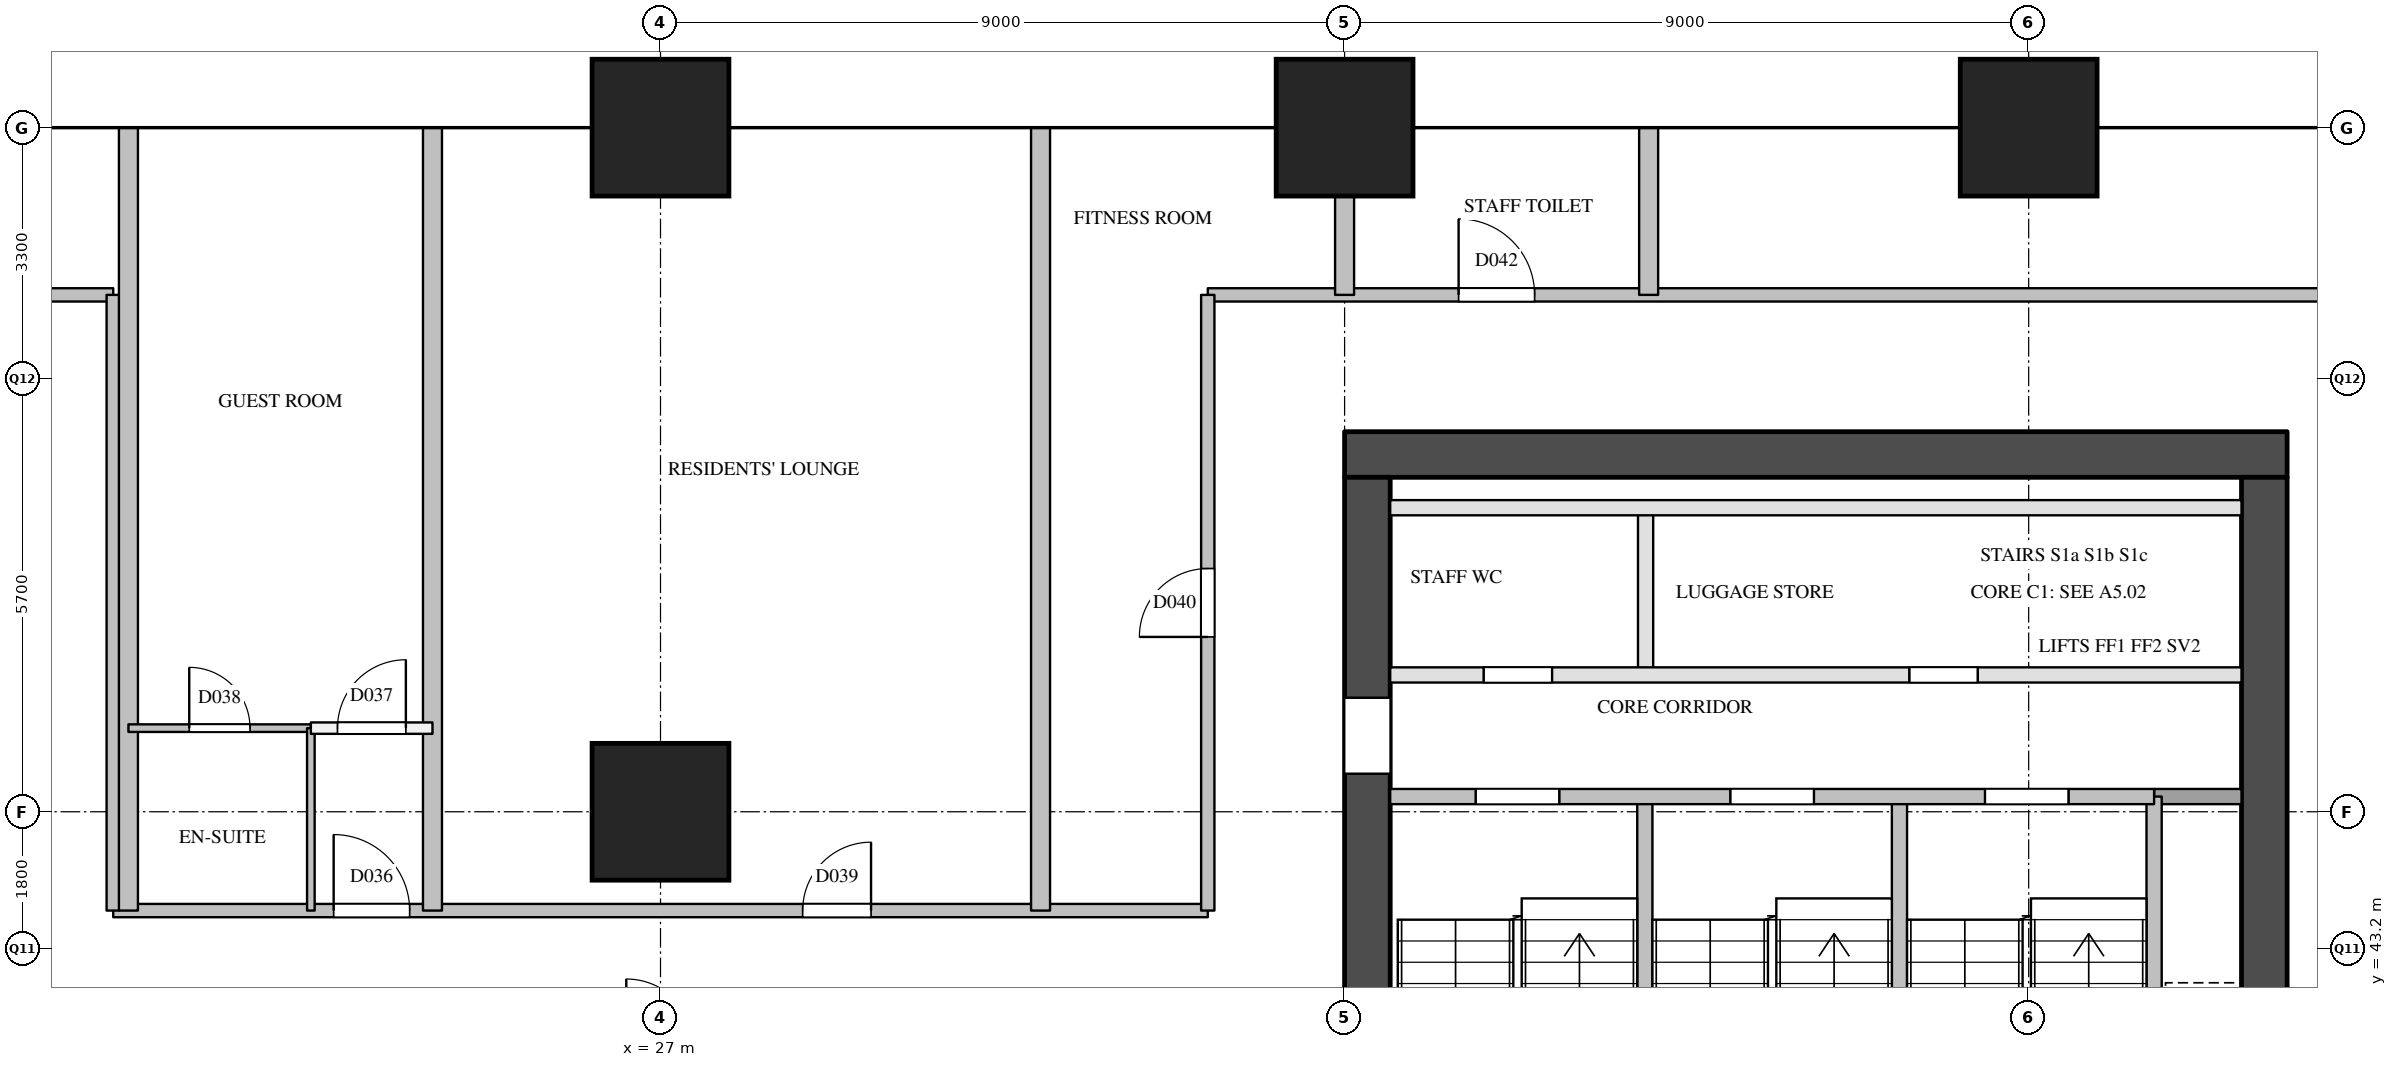
"""IFC4 building model, lengths in metres.
Left out: names, types, materials, properties, quantities, classifications, styles, units other than length and angle.
Written with IfcOpenShell. Run it as: python <this file> out.ifc"""

import sys

from ifc_helpers import new_model, si_unit, direction, frame, frame_2d, origin, origin_2d, place, context, subcontext, project, spatial, rectangle, extrude, element, fill, save


model = new_model("IFC4")
c1 = context("Model", 3, precision=1e-05, world=origin(), true_north=direction((0.0, 1.0)))
c2 = subcontext(c1, "Body", "Model", "MODEL_VIEW")
j1 = project(units=[si_unit("LENGTHUNIT", "METRE"), si_unit("PLANEANGLEUNIT", "RADIAN")], contexts=[c1])
p1 = place(None, origin())
s1 = spatial("IfcSite", under=j1, at=p1, CompositionType="ELEMENT")
p2 = place(p1, origin())
s2 = spatial("IfcBuilding", under=s1, at=p2, CompositionType="ELEMENT")
p3 = place(p2, frame((0.0, 0.0, 34.8)))
s3 = spatial("IfcBuildingStorey", under=s2, at=p3, CompositionType="ELEMENT", Elevation=34.8)
for number, where, z_axis, x_axis in (
    (1, (27.0, 45.0, 0.0), (0.0, 0.0, 1.0), (1.0, 0.0, 0.0)),
    (2, (27.0, 54.0, 0.0), (0.0, 0.0, 1.0), (1.0, 0.0, 0.0)),
    (3, (36.0, 54.0, 0.0), (0.0, 0.0, 1.0), (1.0, 0.0, 0.0)),
    (4, (45.0, 54.0, 0.0), (0.0, 0.0, 1.0), (1.0, 0.0, 0.0)),
):
    element("IfcColumn", number, at=place(p3, frame(where, z_axis=z_axis, x_axis=x_axis)), inside=s3, PredefinedType="COLUMN", context=c2, shape_type="SweptSolid", body=[
        extrude(rectangle(XDim=1.8, YDim=1.8, at=origin_2d()), origin(), (0.0, 0.0, 1.0), 3.8),
    ])
p4 = place(p3, frame((36.0, 49.7, 0.0), z_axis=(0.0, 0.0, 1.0), x_axis=(1.0, 0.0, 0.0)))
e5 = element("IfcWall", 5, at=p4, inside=s3, PredefinedType="SHEAR", context=c2, shape_type="SweptSolid", body=[
    extrude(rectangle(XDim=12.4, YDim=0.6, at=frame_2d((6.2, 0.0))), origin(), (0.0, 0.0, 1.0), 3.5),
])
p5 = place(p3, frame((36.3, 29.1, 0.0), z_axis=(0.0, 0.0, 1.0), x_axis=(0.0, 1.0, 0.0)))
e6 = element("IfcWall", 6, at=p5, inside=s3, PredefinedType="SHEAR", context=c2, shape_type="SweptSolid", body=[
    extrude(rectangle(XDim=20.3, YDim=0.6, at=frame_2d((10.15, 0.0))), origin(), (0.0, 0.0, 1.0), 3.5),
])
p6 = place(p5, frame((3.6, 0.0, 0.0)))
e7 = element("IfcOpeningElement", 7, at=p6, cuts=e6, PredefinedType="OPENING", context=c2, shape_type="SweptSolid", body=[
    extrude(rectangle(XDim=1.8, YDim=2.1, at=frame_2d((0.9, 1.05))), frame((0.0, 0.31, 0.0), z_axis=(0.0, -1.0, 0.0), x_axis=(1.0, 0.0, 0.0)), (0.0, 0.0, 1.0), 0.62),
])
p7 = place(p5, frame((16.4, 0.0, 0.0)))
e8 = element("IfcOpeningElement", 8, at=p7, cuts=e6, PredefinedType="OPENING", context=c2, shape_type="SweptSolid", body=[
    extrude(rectangle(XDim=1.0, YDim=2.1, at=frame_2d((0.5, 1.05))), frame((0.0, 0.31, 0.0), z_axis=(0.0, -1.0, 0.0), x_axis=(1.0, 0.0, 0.0)), (0.0, 0.0, 1.0), 0.62),
])
p8 = place(p3, frame((48.1, 29.1, 0.0), z_axis=(0.0, 0.0, 1.0), x_axis=(0.0, 1.0, 0.0)))
e9 = element("IfcWall", 9, at=p8, inside=s3, PredefinedType="SHEAR", context=c2, shape_type="SweptSolid", body=[
    extrude(rectangle(XDim=20.3, YDim=0.6, at=frame_2d((10.15, 0.0))), origin(), (0.0, 0.0, 1.0), 3.5),
])
p9 = place(p8, frame((12.5, 0.0, 0.0)))
e10 = element("IfcOpeningElement", 10, at=p9, cuts=e9, PredefinedType="OPENING", context=c2, shape_type="SweptSolid", body=[
    extrude(rectangle(XDim=0.7, YDim=2.1, at=frame_2d((0.35, 1.05))), frame((0.0, 0.31, 0.0), z_axis=(0.0, -1.0, 0.0), x_axis=(1.0, 0.0, 0.0)), (0.0, 0.0, 1.0), 0.62),
])
p10 = place(p8, frame((3.9, 0.0, 0.0)))
e11 = element("IfcOpeningElement", 11, at=p10, cuts=e9, PredefinedType="OPENING", context=c2, shape_type="SweptSolid", body=[
    extrude(rectangle(XDim=1.8, YDim=2.1, at=frame_2d((0.9, 1.05))), frame((0.0, 0.31, 0.0), z_axis=(0.0, -1.0, 0.0), x_axis=(1.0, 0.0, 0.0)), (0.0, 0.0, 1.0), 0.62),
])
p11 = place(p3, frame((39.95, 40.78, 0.0), z_axis=(0.0, 0.0, 1.0), x_axis=(0.0, 1.0, 0.0)))
e12 = element("IfcWall", 12, at=p11, inside=s3, PredefinedType="SOLIDWALL", context=c2, shape_type="SweptSolid", body=[
    extrude(rectangle(XDim=4.42, YDim=0.2, at=frame_2d((2.21, 0.0))), origin(), (0.0, 0.0, 1.0), 3.5),
])
p12 = place(p3, frame((39.96, 46.8, 0.0), z_axis=(0.0, 0.0, 1.0), x_axis=(0.0, 1.0, 0.0)))
e13 = element("IfcWall", 13, at=p12, inside=s3, PredefinedType="PARTITIONING", context=c2, shape_type="SweptSolid", body=[
    extrude(rectangle(XDim=2.2, YDim=0.2, at=frame_2d((1.1, 0.0))), origin(), (0.0, 0.0, 1.0), 3.5),
])
for number, where, z_axis, x_axis in (
    (14, (43.3, 40.78, 0.0), (0.0, 0.0, 1.0), (0.0, 1.0, 0.0)),
    (15, (46.65, 40.78, 0.0), (0.0, 0.0, 1.0), (0.0, 1.0, 0.0)),
):
    element("IfcWall", number, at=place(p3, frame(where, z_axis=z_axis, x_axis=x_axis)), inside=s3, PredefinedType="SOLIDWALL", context=c2, shape_type="SweptSolid", body=[
        extrude(rectangle(XDim=4.42, YDim=0.2, at=frame_2d((2.21, 0.0))), origin(), (0.0, 0.0, 1.0), 3.5),
    ])
p13 = place(p3, frame((46.65, 45.2, 0.0), z_axis=(0.0, 0.0, 1.0), x_axis=(1.0, 0.0, 0.0)))
e16 = element("IfcWall", 16, at=p13, inside=s3, PredefinedType="SOLIDWALL", context=c2, shape_type="SweptSolid", body=[
    extrude(rectangle(XDim=1.15, YDim=0.2, at=frame_2d((0.575, 0.0))), origin(), (0.0, 0.0, 1.0), 3.5),
])
p14 = place(p3, frame((36.6, 45.2, 0.0), z_axis=(0.0, 0.0, 1.0), x_axis=(1.0, 0.0, 0.0)))
e17 = element("IfcWall", 17, at=p14, inside=s3, PredefinedType="SOLIDWALL", context=c2, shape_type="SweptSolid", body=[
    extrude(rectangle(XDim=10.05, YDim=0.2, at=frame_2d((5.025, 0.0))), origin(), (0.0, 0.0, 1.0), 3.5),
])
p15 = place(p14, frame((1.125, 0.0, 0.0)))
e18 = element("IfcOpeningElement", 18, at=p15, cuts=e17, PredefinedType="OPENING", context=c2, shape_type="SweptSolid", body=[
    extrude(rectangle(XDim=1.1, YDim=2.1, at=frame_2d((0.55, 1.05))), frame((0.0, 0.11, 0.0), z_axis=(0.0, -1.0, 0.0), x_axis=(1.0, 0.0, 0.0)), (0.0, 0.0, 1.0), 0.22),
])
p16 = place(p14, frame((4.475, 0.0, 0.0)))
e19 = element("IfcOpeningElement", 19, at=p16, cuts=e17, PredefinedType="OPENING", context=c2, shape_type="SweptSolid", body=[
    extrude(rectangle(XDim=1.1, YDim=2.1, at=frame_2d((0.55, 1.05))), frame((0.0, 0.11, 0.0), z_axis=(0.0, -1.0, 0.0), x_axis=(1.0, 0.0, 0.0)), (0.0, 0.0, 1.0), 0.22),
])
p17 = place(p14, frame((7.825, 0.0, 0.0)))
e20 = element("IfcOpeningElement", 20, at=p17, cuts=e17, PredefinedType="OPENING", context=c2, shape_type="SweptSolid", body=[
    extrude(rectangle(XDim=1.1, YDim=2.1, at=frame_2d((0.55, 1.05))), frame((0.0, 0.11, 0.0), z_axis=(0.0, -1.0, 0.0), x_axis=(1.0, 0.0, 0.0)), (0.0, 0.0, 1.0), 0.22),
])
p18 = place(p3, frame((36.6, 46.8, 0.0), z_axis=(0.0, 0.0, 1.0), x_axis=(1.0, 0.0, 0.0)))
e21 = element("IfcWall", 21, at=p18, inside=s3, PredefinedType="PARTITIONING", context=c2, shape_type="SweptSolid", body=[
    extrude(rectangle(XDim=11.2, YDim=0.2, at=frame_2d((5.6, 0.0))), origin(), (0.0, 0.0, 1.0), 3.5),
])
p19 = place(p18, frame((1.23, 0.0, 0.0)))
e22 = element("IfcOpeningElement", 22, at=p19, cuts=e21, PredefinedType="OPENING", context=c2, shape_type="SweptSolid", body=[
    extrude(rectangle(XDim=0.9, YDim=2.1, at=frame_2d((0.45, 1.05))), frame((0.0, 0.11, 0.0), z_axis=(0.0, -1.0, 0.0), x_axis=(1.0, 0.0, 0.0)), (0.0, 0.0, 1.0), 0.22),
])
p20 = place(p18, frame((6.83, 0.0, 0.0)))
e23 = element("IfcOpeningElement", 23, at=p20, cuts=e21, PredefinedType="OPENING", context=c2, shape_type="SweptSolid", body=[
    extrude(rectangle(XDim=0.9, YDim=2.1, at=frame_2d((0.45, 1.05))), frame((0.0, 0.11, 0.0), z_axis=(0.0, -1.0, 0.0), x_axis=(1.0, 0.0, 0.0)), (0.0, 0.0, 1.0), 0.22),
])
p21 = place(p3, frame((36.6, 49.0, 0.0), z_axis=(0.0, 0.0, 1.0), x_axis=(1.0, 0.0, 0.0)))
e24 = element("IfcWall", 24, at=p21, inside=s3, PredefinedType="PARTITIONING", context=c2, shape_type="SweptSolid", body=[
    extrude(rectangle(XDim=11.2, YDim=0.2, at=frame_2d((5.6, 0.0))), origin(), (0.0, 0.0, 1.0), 3.5),
])
p22 = place(p3, frame((19.8, 43.7, 0.0), z_axis=(0.0, 0.0, 1.0), x_axis=(1.0, 0.0, 0.0)))
e25 = element("IfcWall", 25, at=p22, inside=s3, PredefinedType="PARTITIONING", context=c2, shape_type="SweptSolid", body=[
    extrude(rectangle(XDim=14.4, YDim=0.175, at=frame_2d((7.2, 0.0))), origin(), (0.0, 0.0, 1.0), 2.5),
])
p23 = place(p22, frame((2.9, 0.0, 0.0)))
e26 = element("IfcOpeningElement", 26, at=p23, cuts=e25, PredefinedType="OPENING", context=c2, shape_type="SweptSolid", body=[
    extrude(rectangle(XDim=1.0, YDim=2.1, at=frame_2d((0.5, 1.05))), frame((0.0, 0.097, 0.0), z_axis=(0.0, -1.0, 0.0), x_axis=(1.0, 0.0, 0.0)), (0.0, 0.0, 1.0), 0.195),
])
p24 = place(p22, frame((9.07, 0.0, 0.0)))
e27 = element("IfcOpeningElement", 27, at=p24, cuts=e25, PredefinedType="OPENING", context=c2, shape_type="SweptSolid", body=[
    extrude(rectangle(XDim=0.9, YDim=2.1, at=frame_2d((0.45, 1.05))), frame((0.0, 0.097, 0.0), z_axis=(0.0, -1.0, 0.0), x_axis=(1.0, 0.0, 0.0)), (0.0, 0.0, 1.0), 0.195),
])
p25 = place(p3, frame((3.8, 51.8, 0.0), z_axis=(0.0, 0.0, 1.0), x_axis=(1.0, 0.0, 0.0)))
e28 = element("IfcWall", 28, at=p25, inside=s3, PredefinedType="PARTITIONING", context=c2, shape_type="SweptSolid", body=[
    extrude(rectangle(XDim=16.0, YDim=0.175, at=frame_2d((8.0, 0.0))), origin(), (0.0, 0.0, 1.0), 3.5),
])
p26 = place(p25, frame((11.65, 0.0, 0.0)))
e29 = element("IfcOpeningElement", 29, at=p26, cuts=e28, PredefinedType="OPENING", context=c2, shape_type="SweptSolid", body=[
    extrude(rectangle(XDim=0.9, YDim=2.1, at=frame_2d((0.45, 1.05))), frame((0.0, 0.097, 0.0), z_axis=(0.0, -1.0, 0.0), x_axis=(1.0, 0.0, 0.0)), (0.0, 0.0, 1.0), 0.195),
])
p27 = place(p3, frame((34.2, 51.8, 0.0), z_axis=(0.0, 0.0, 1.0), x_axis=(1.0, 0.0, 0.0)))
e30 = element("IfcWall", 30, at=p27, inside=s3, PredefinedType="PARTITIONING", context=c2, shape_type="SweptSolid", body=[
    extrude(rectangle(XDim=16.0, YDim=0.175, at=frame_2d((8.0, 0.0))), origin(), (0.0, 0.0, 1.0), 3.5),
])
p28 = place(p27, frame((3.3, 0.0, 0.0)))
e31 = element("IfcOpeningElement", 31, at=p28, cuts=e30, PredefinedType="OPENING", context=c2, shape_type="SweptSolid", body=[
    extrude(rectangle(XDim=1.0, YDim=2.1, at=frame_2d((0.5, 1.05))), frame((0.0, 0.097, 0.0), z_axis=(0.0, -1.0, 0.0), x_axis=(1.0, 0.0, 0.0)), (0.0, 0.0, 1.0), 0.195),
])
p29 = place(p3, frame((19.8, 43.7, 0.0), z_axis=(0.0, 0.0, 1.0), x_axis=(0.0, 1.0, 0.0)))
e32 = element("IfcWall", 32, at=p29, inside=s3, PredefinedType="PARTITIONING", context=c2, shape_type="SweptSolid", body=[
    extrude(rectangle(XDim=8.1, YDim=0.175, at=frame_2d((4.05, 0.0))), origin(), (0.0, 0.0, 1.0), 3.5),
])
p30 = place(p3, frame((34.2, 43.7, 0.0), z_axis=(0.0, 0.0, 1.0), x_axis=(0.0, 1.0, 0.0)))
e33 = element("IfcWall", 33, at=p30, inside=s3, PredefinedType="PARTITIONING", context=c2, shape_type="SweptSolid", body=[
    extrude(rectangle(XDim=8.1, YDim=0.175, at=frame_2d((4.05, 0.0))), origin(), (0.0, 0.0, 1.0), 3.5),
])
p31 = place(p30, frame((3.6, 0.0, 0.0)))
e34 = element("IfcOpeningElement", 34, at=p31, cuts=e33, PredefinedType="OPENING", context=c2, shape_type="SweptSolid", body=[
    extrude(rectangle(XDim=0.9, YDim=2.1, at=frame_2d((0.45, 1.05))), frame((0.0, 0.097, 0.0), z_axis=(0.0, -1.0, 0.0), x_axis=(1.0, 0.0, 0.0)), (0.0, 0.0, 1.0), 0.195),
])
p32 = place(p3, frame((22.4, 46.1, 0.0), z_axis=(0.0, 0.0, 1.0), x_axis=(1.0, 0.0, 0.0)))
e35 = element("IfcWall", 35, at=p32, inside=s3, PredefinedType="PARTITIONING", context=c2, shape_type="SweptSolid", body=[
    extrude(rectangle(XDim=1.6, YDim=0.15, at=frame_2d((0.8, 0.0))), origin(), (0.0, 0.0, 1.0), 3.5),
])
p33 = place(p32, frame((0.35, 0.0, 0.0)))
e36 = element("IfcOpeningElement", 36, at=p33, cuts=e35, PredefinedType="OPENING", context=c2, shape_type="SweptSolid", body=[
    extrude(rectangle(XDim=0.9, YDim=2.1, at=frame_2d((0.45, 1.05))), frame((0.0, 0.085, 0.0), z_axis=(0.0, -1.0, 0.0), x_axis=(1.0, 0.0, 0.0)), (0.0, 0.0, 1.0), 0.17),
])
for number, where, z_axis, x_axis in (
    (37, (20.0, 43.7, 0.0), (0.0, 0.0, 1.0), (0.0, 1.0, 0.0)),
    (38, (24.0, 43.7, 0.0), (0.0, 0.0, 1.0), (0.0, 1.0, 0.0)),
    (39, (32.0, 43.7, 0.0), (0.0, 0.0, 1.0), (0.0, 1.0, 0.0)),
):
    element("IfcWall", number, at=place(p3, frame(where, z_axis=z_axis, x_axis=x_axis)), inside=s3, PredefinedType="PARTITIONING", context=c2, shape_type="SweptSolid", body=[
        extrude(rectangle(XDim=10.3, YDim=0.25, at=frame_2d((5.15, 0.0))), origin(), (0.0, 0.0, 1.0), 2.5),
    ])
p34 = place(p3, frame((36.0, 51.8, 0.0), z_axis=(0.0, 0.0, 1.0), x_axis=(0.0, 1.0, 0.0)))
e40 = element("IfcWall", 40, at=p34, inside=s3, PredefinedType="PARTITIONING", context=c2, shape_type="SweptSolid", body=[
    extrude(rectangle(XDim=2.2, YDim=0.25, at=frame_2d((1.1, 0.0))), origin(), (0.0, 0.0, 1.0), 3.5),
])
p35 = place(p3, frame((40.0, 51.8, 0.0), z_axis=(0.0, 0.0, 1.0), x_axis=(0.0, 1.0, 0.0)))
e41 = element("IfcWall", 41, at=p35, inside=s3, PredefinedType="PARTITIONING", context=c2, shape_type="SweptSolid", body=[
    extrude(rectangle(XDim=2.2, YDim=0.25, at=frame_2d((1.1, 0.0))), origin(), (0.0, 0.0, 1.0), 2.5),
])
p36 = place(p3, frame((20.0, 46.1, 0.0), z_axis=(0.0, 0.0, 1.0), x_axis=(1.0, 0.0, 0.0)))
e42 = element("IfcWall", 42, at=p36, inside=s3, PredefinedType="PARTITIONING", context=c2, shape_type="SweptSolid", body=[
    extrude(rectangle(XDim=2.4, YDim=0.1, at=frame_2d((1.2, 0.0))), origin(), (0.0, 0.0, 1.0), 3.5),
])
p37 = place(p36, frame((0.8, 0.0, 0.0)))
e43 = element("IfcOpeningElement", 43, at=p37, cuts=e42, PredefinedType="OPENING", context=c2, shape_type="SweptSolid", body=[
    extrude(rectangle(XDim=0.8, YDim=2.1, at=frame_2d((0.4, 1.05))), frame((0.0, 0.06, 0.0), z_axis=(0.0, -1.0, 0.0), x_axis=(1.0, 0.0, 0.0)), (0.0, 0.0, 1.0), 0.12),
])
p38 = place(p3, frame((22.4, 43.7, 0.0), z_axis=(0.0, 0.0, 1.0), x_axis=(0.0, 1.0, 0.0)))
e44 = element("IfcWall", 44, at=p38, inside=s3, PredefinedType="PARTITIONING", context=c2, shape_type="SweptSolid", body=[
    extrude(rectangle(XDim=2.4, YDim=0.1, at=frame_2d((1.2, 0.0))), origin(), (0.0, 0.0, 1.0), 3.5),
])
p39 = place(p15, origin())
e45 = element("IfcDoor", 45, at=p39, inside=s3, OperationType="SINGLE_SWING_LEFT", PredefinedType="DOOR", context=c2, shape_type="SweptSolid", body=[
    extrude(rectangle(XDim=1.1, YDim=2.1, at=frame_2d((0.55, 1.05))), frame((0.0, 0.025, 0.0), z_axis=(0.0, -1.0, 0.0), x_axis=(1.0, 0.0, 0.0)), (0.0, 0.0, 1.0), 0.05),
])
fill(e18, e45)
p40 = place(p16, origin())
e46 = element("IfcDoor", 46, at=p40, inside=s3, OperationType="SINGLE_SWING_RIGHT", PredefinedType="DOOR", context=c2, shape_type="SweptSolid", body=[
    extrude(rectangle(XDim=1.1, YDim=2.1, at=frame_2d((0.55, 1.05))), frame((0.0, 0.025, 0.0), z_axis=(0.0, -1.0, 0.0), x_axis=(1.0, 0.0, 0.0)), (0.0, 0.0, 1.0), 0.05),
])
fill(e19, e46)
p41 = place(p17, origin())
e47 = element("IfcDoor", 47, at=p41, inside=s3, OperationType="SINGLE_SWING_RIGHT", PredefinedType="DOOR", context=c2, shape_type="SweptSolid", body=[
    extrude(rectangle(XDim=1.1, YDim=2.1, at=frame_2d((0.55, 1.05))), frame((0.0, 0.025, 0.0), z_axis=(0.0, -1.0, 0.0), x_axis=(1.0, 0.0, 0.0)), (0.0, 0.0, 1.0), 0.05),
])
fill(e20, e47)
p42 = place(p7, origin())
e48 = element("IfcDoor", 48, at=p42, inside=s3, OperationType="SINGLE_SWING_RIGHT", PredefinedType="DOOR", context=c2, shape_type="SweptSolid", body=[
    extrude(rectangle(XDim=1.0, YDim=2.1, at=frame_2d((0.5, 1.05))), frame((0.0, 0.025, 0.0), z_axis=(0.0, -1.0, 0.0), x_axis=(1.0, 0.0, 0.0)), (0.0, 0.0, 1.0), 0.05),
])
fill(e8, e48)
p43 = place(p19, origin())
e49 = element("IfcDoor", 49, at=p43, inside=s3, OperationType="SINGLE_SWING_LEFT", PredefinedType="DOOR", context=c2, shape_type="SweptSolid", body=[
    extrude(rectangle(XDim=0.9, YDim=2.1, at=frame_2d((0.45, 1.05))), frame((0.0, 0.025, 0.0), z_axis=(0.0, -1.0, 0.0), x_axis=(1.0, 0.0, 0.0)), (0.0, 0.0, 1.0), 0.05),
])
fill(e22, e49)
p44 = place(p20, origin())
e50 = element("IfcDoor", 50, at=p44, inside=s3, OperationType="SINGLE_SWING_RIGHT", PredefinedType="DOOR", context=c2, shape_type="SweptSolid", body=[
    extrude(rectangle(XDim=0.9, YDim=2.1, at=frame_2d((0.45, 1.05))), frame((0.0, 0.025, 0.0), z_axis=(0.0, -1.0, 0.0), x_axis=(1.0, 0.0, 0.0)), (0.0, 0.0, 1.0), 0.05),
])
fill(e23, e50)
p45 = place(p23, origin())
e51 = element("IfcDoor", 51, at=p45, inside=s3, OperationType="SINGLE_SWING_LEFT", PredefinedType="DOOR", context=c2, shape_type="SweptSolid", body=[
    extrude(rectangle(XDim=1.0, YDim=2.1, at=frame_2d((0.5, 1.05))), frame((0.0, 0.025, 0.0), z_axis=(0.0, -1.0, 0.0), x_axis=(1.0, 0.0, 0.0)), (0.0, 0.0, 1.0), 0.05),
])
fill(e26, e51)
p46 = place(p33, origin())
e52 = element("IfcDoor", 52, at=p46, inside=s3, OperationType="SINGLE_SWING_RIGHT", PredefinedType="DOOR", context=c2, shape_type="SweptSolid", body=[
    extrude(rectangle(XDim=0.9, YDim=2.1, at=frame_2d((0.45, 1.05))), frame((0.0, 0.025, 0.0), z_axis=(0.0, -1.0, 0.0), x_axis=(1.0, 0.0, 0.0)), (0.0, 0.0, 1.0), 0.05),
])
fill(e36, e52)
p47 = place(p37, origin())
e53 = element("IfcDoor", 53, at=p47, inside=s3, OperationType="SINGLE_SWING_LEFT", PredefinedType="DOOR", context=c2, shape_type="SweptSolid", body=[
    extrude(rectangle(XDim=0.8, YDim=2.1, at=frame_2d((0.4, 1.05))), frame((0.0, 0.025, 0.0), z_axis=(0.0, -1.0, 0.0), x_axis=(1.0, 0.0, 0.0)), (0.0, 0.0, 1.0), 0.05),
])
fill(e43, e53)
p48 = place(p24, origin())
e54 = element("IfcDoor", 54, at=p48, inside=s3, OperationType="SINGLE_SWING_RIGHT", PredefinedType="DOOR", context=c2, shape_type="SweptSolid", body=[
    extrude(rectangle(XDim=0.9, YDim=2.1, at=frame_2d((0.45, 1.05))), frame((0.0, 0.025, 0.0), z_axis=(0.0, -1.0, 0.0), x_axis=(1.0, 0.0, 0.0)), (0.0, 0.0, 1.0), 0.05),
])
fill(e27, e54)
p49 = place(p31, origin())
e55 = element("IfcDoor", 55, at=p49, inside=s3, OperationType="SINGLE_SWING_LEFT", PredefinedType="DOOR", context=c2, shape_type="SweptSolid", body=[
    extrude(rectangle(XDim=0.9, YDim=2.1, at=frame_2d((0.45, 1.05))), frame((0.0, 0.025, 0.0), z_axis=(0.0, -1.0, 0.0), x_axis=(1.0, 0.0, 0.0)), (0.0, 0.0, 1.0), 0.05),
])
fill(e34, e55)
p50 = place(p28, origin())
e56 = element("IfcDoor", 56, at=p50, inside=s3, OperationType="SINGLE_SWING_LEFT", PredefinedType="DOOR", context=c2, shape_type="SweptSolid", body=[
    extrude(rectangle(XDim=1.0, YDim=2.1, at=frame_2d((0.5, 1.05))), frame((0.0, 0.025, 0.0), z_axis=(0.0, -1.0, 0.0), x_axis=(1.0, 0.0, 0.0)), (0.0, 0.0, 1.0), 0.05),
])
fill(e31, e56)
save(model, sys.argv[1])
